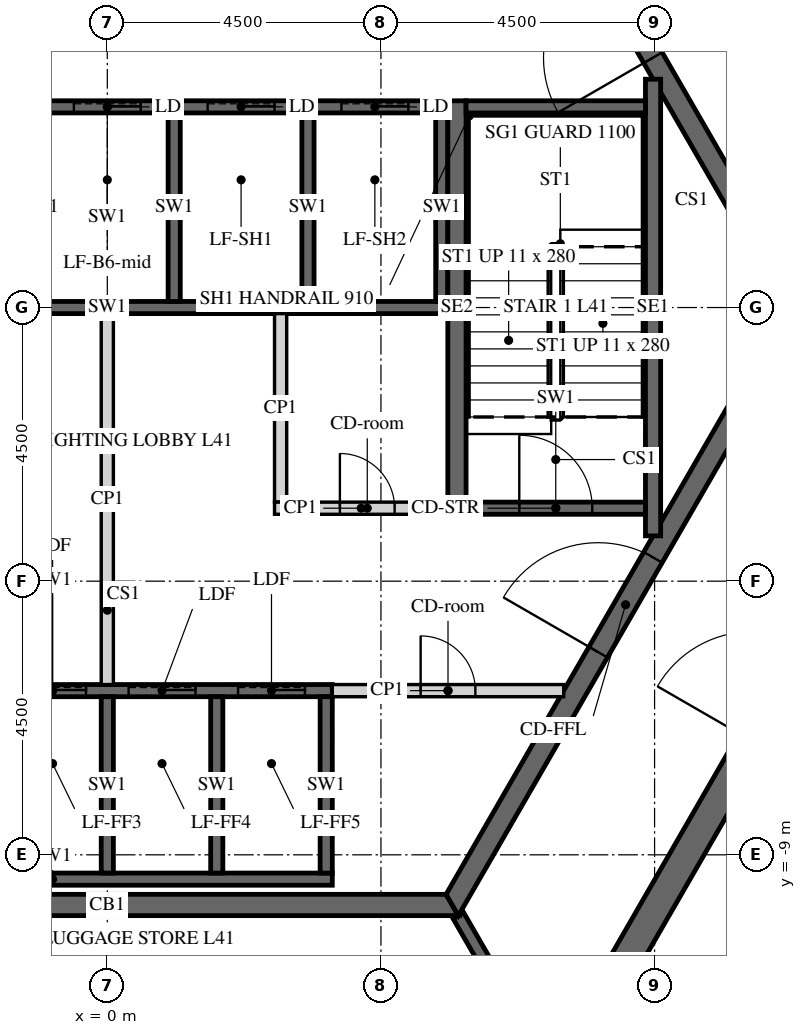
"""IFC4 building model, lengths in metres.
Left out: names, types, materials, properties, quantities, classifications, styles, units other than length and angle.
Written with IfcOpenShell. Run it as: python <this file> out.ifc"""

import sys

from ifc_helpers import new_model, si_unit, direction, frame, frame_2d, origin, place, context, subcontext, project, spatial, polyline, rectangle, outline, extrude, element, fill, save


model = new_model("IFC4")
c1 = context("Model", 3, precision=1e-05, world=origin(), true_north=direction((0.0, 1.0)))
c2 = subcontext(c1, "Body", "Model", "MODEL_VIEW")
j1 = project(units=[si_unit("LENGTHUNIT", "METRE"), si_unit("PLANEANGLEUNIT", "RADIAN")], contexts=[c1])
p1 = place(None, origin())
s1 = spatial("IfcSite", under=j1, at=p1, CompositionType="ELEMENT")
p2 = place(p1, origin())
s2 = spatial("IfcBuilding", under=s1, at=p2, CompositionType="ELEMENT")
p3 = place(p2, frame((0.0, 0.0, 176.1)))
s3 = spatial("IfcBuildingStorey", under=s2, at=p3, CompositionType="ELEMENT", Elevation=176.1)
p4 = place(p3, frame((7.361, -12.75, -0.15), z_axis=(0.0, 0.0, 1.0), x_axis=(0.50000571537, 0.866022103989, 0.0)))
e1 = element("IfcWall", 1, at=p4, inside=s3, PredefinedType="SHEAR", context=c2, shape_type="SweptSolid", body=[
    extrude(outline(polyline([(-0.144, -0.25), (14.867, -0.25), (14.578, 0.25), (0.144, 0.25), (-0.144, -0.25)])), origin(), (0.0, 0.0, 1.0), 3.9),
])
p5 = place(p4, frame((6.49, 0.0, 0.15)))
e2 = element("IfcOpeningElement", 2, at=p5, cuts=e1, PredefinedType="OPENING", context=c2, shape_type="SweptSolid", body=[
    extrude(rectangle(XDim=1.8, YDim=2.4, at=frame_2d((0.9, 1.2))), frame((0.0, 0.26, 0.0), z_axis=(0.0, -1.0, 0.0), x_axis=(1.0, 0.0, 0.0)), (0.0, 0.0, 1.0), 0.52),
])
p6 = place(p3, frame((14.722, 0.0, -0.15), z_axis=(0.0, 0.0, 1.0), x_axis=(-0.50000571537, 0.866022103989, 0.0)))
e3 = element("IfcWall", 3, at=p6, inside=s3, PredefinedType="SHEAR", context=c2, shape_type="SweptSolid", body=[
    extrude(outline(polyline([(-0.144, -0.25), (14.867, -0.25), (14.578, 0.25), (0.144, 0.25), (-0.144, -0.25)])), origin(), (0.0, 0.0, 1.0), 3.9),
])
p7 = place(p6, frame((6.432, 0.0, 0.15)))
e4 = element("IfcOpeningElement", 4, at=p7, cuts=e3, PredefinedType="OPENING", context=c2, shape_type="SweptSolid", body=[
    extrude(rectangle(XDim=1.8, YDim=2.4, at=frame_2d((0.9, 1.2))), frame((0.0, 0.26, 0.0), z_axis=(0.0, -1.0, 0.0), x_axis=(1.0, 0.0, 0.0)), (0.0, 0.0, 1.0), 0.52),
])
p8 = place(p3, frame((-5.673, -9.825, -0.15), z_axis=(0.0, 0.0, 1.0), x_axis=(1.0, 0.0, 0.0)))
e5 = element("IfcWall", 5, at=p8, inside=s3, PredefinedType="SHEAR", context=c2, shape_type="SweptSolid", body=[
    extrude(outline(polyline([(-0.101, -0.175), (11.446, -0.175), (11.244, 0.175), (0.101, 0.175), (-0.101, -0.175)])), origin(), (0.0, 0.0, 1.0), 3.9),
])
p9 = place(p3, frame((5.673, -9.825, -0.15), z_axis=(0.0, 0.0, 1.0), x_axis=(0.499995046907, 0.866028263435, 0.0)))
e6 = element("IfcWall", 6, at=p9, inside=s3, PredefinedType="SHEAR", context=c2, shape_type="SweptSolid", body=[
    extrude(outline(polyline([(-0.101, -0.175), (11.446, -0.175), (11.244, 0.175), (0.101, 0.175), (-0.101, -0.175)])), origin(), (0.0, 0.0, 1.0), 3.9),
])
p10 = place(p9, frame((4.801, 0.0, 0.15)))
e7 = element("IfcOpeningElement", 7, at=p10, cuts=e6, PredefinedType="OPENING", context=c2, shape_type="SweptSolid", body=[
    extrude(rectangle(XDim=1.8, YDim=2.4, at=frame_2d((0.9, 1.2))), frame((0.0, 0.185, 0.0), z_axis=(0.0, -1.0, 0.0), x_axis=(1.0, 0.0, 0.0)), (0.0, 0.0, 1.0), 0.37),
])
p11 = place(p3, frame((11.345, 0.0, -0.15), z_axis=(0.0, 0.0, 1.0), x_axis=(-0.499995046907, 0.866028263435, 0.0)))
e8 = element("IfcWall", 8, at=p11, inside=s3, PredefinedType="SHEAR", context=c2, shape_type="SweptSolid", body=[
    extrude(outline(polyline([(-0.101, -0.175), (11.446, -0.175), (11.244, 0.175), (0.101, 0.175), (-0.101, -0.175)])), origin(), (0.0, 0.0, 1.0), 3.9),
])
p12 = place(p11, frame((4.744, 0.0, 0.15)))
e9 = element("IfcOpeningElement", 9, at=p12, cuts=e8, PredefinedType="OPENING", context=c2, shape_type="SweptSolid", body=[
    extrude(rectangle(XDim=1.8, YDim=2.4, at=frame_2d((0.9, 1.2))), frame((0.0, 0.185, 0.0), z_axis=(0.0, -1.0, 0.0), x_axis=(1.0, 0.0, 0.0)), (0.0, 0.0, 1.0), 0.37),
])
p13 = place(p3, frame((-5.6, 3.3, -0.25), z_axis=(0.0, 0.0, 1.0), x_axis=(1.0, 0.0, 0.0)))
e10 = element("IfcWall", 10, at=p13, inside=s3, PredefinedType="SHEAR", context=c2, shape_type="SweptSolid", body=[
    extrude(rectangle(XDim=11.2, YDim=0.2, at=frame_2d((5.6, 0.0))), origin(), (0.0, 0.0, 1.0), 3.9),
])
p14 = place(p13, frame((0.65, 0.0, 0.25)))
e11 = element("IfcOpeningElement", 11, at=p14, cuts=e10, PredefinedType="OPENING", context=c2, shape_type="SweptSolid", body=[
    extrude(rectangle(XDim=1.1, YDim=2.1, at=frame_2d((0.55, 1.05))), frame((0.0, 0.11, 0.0), z_axis=(0.0, -1.0, 0.0), x_axis=(1.0, 0.0, 0.0)), (0.0, 0.0, 1.0), 0.22),
])
p15 = place(p13, frame((2.85, 0.0, 0.25)))
e12 = element("IfcOpeningElement", 12, at=p15, cuts=e10, PredefinedType="OPENING", context=c2, shape_type="SweptSolid", body=[
    extrude(rectangle(XDim=1.1, YDim=2.1, at=frame_2d((0.55, 1.05))), frame((0.0, 0.11, 0.0), z_axis=(0.0, -1.0, 0.0), x_axis=(1.0, 0.0, 0.0)), (0.0, 0.0, 1.0), 0.22),
])
p16 = place(p13, frame((5.05, 0.0, 0.25)))
e13 = element("IfcOpeningElement", 13, at=p16, cuts=e10, PredefinedType="OPENING", context=c2, shape_type="SweptSolid", body=[
    extrude(rectangle(XDim=1.1, YDim=2.1, at=frame_2d((0.55, 1.05))), frame((0.0, 0.11, 0.0), z_axis=(0.0, -1.0, 0.0), x_axis=(1.0, 0.0, 0.0)), (0.0, 0.0, 1.0), 0.22),
])
p17 = place(p13, frame((7.25, 0.0, 0.25)))
e14 = element("IfcOpeningElement", 14, at=p17, cuts=e10, PredefinedType="OPENING", context=c2, shape_type="SweptSolid", body=[
    extrude(rectangle(XDim=1.1, YDim=2.1, at=frame_2d((0.55, 1.05))), frame((0.0, 0.11, 0.0), z_axis=(0.0, -1.0, 0.0), x_axis=(1.0, 0.0, 0.0)), (0.0, 0.0, 1.0), 0.22),
])
p18 = place(p13, frame((9.45, 0.0, 0.25)))
e15 = element("IfcOpeningElement", 15, at=p18, cuts=e10, PredefinedType="OPENING", context=c2, shape_type="SweptSolid", body=[
    extrude(rectangle(XDim=1.1, YDim=2.1, at=frame_2d((0.55, 1.05))), frame((0.0, 0.11, 0.0), z_axis=(0.0, -1.0, 0.0), x_axis=(1.0, 0.0, 0.0)), (0.0, 0.0, 1.0), 0.22),
])
p19 = place(p3, frame((-5.6, 0.0, -0.25), z_axis=(0.0, 0.0, 1.0), x_axis=(1.0, 0.0, 0.0)))
e16 = element("IfcWall", 16, at=p19, inside=s3, PredefinedType="SHEAR", context=c2, shape_type="SweptSolid", body=[
    extrude(rectangle(XDim=11.2, YDim=0.2, at=frame_2d((5.6, 0.0))), origin(), (0.0, 0.0, 1.0), 3.9),
])
for number, where, z_axis, x_axis in (
    (17, (1.1, 0.1, -0.25), (0.0, 0.0, 1.0), (0.0, 1.0, 0.0)),
    (18, (3.3, 0.1, -0.25), (0.0, 0.0, 1.0), (0.0, 1.0, 0.0)),
    (19, (5.5, 0.1, -0.25), (0.0, 0.0, 1.0), (0.0, 1.0, 0.0)),
):
    element("IfcWall", number, at=place(p3, frame(where, z_axis=z_axis, x_axis=x_axis)), inside=s3, PredefinedType="SHEAR", context=c2, shape_type="SweptSolid", body=[
        extrude(rectangle(XDim=3.1, YDim=0.2, at=frame_2d((1.55, 0.0))), origin(), (0.0, 0.0, 1.0), 3.9),
    ])
p20 = place(p3, frame((-5.5, -6.3, -0.25), z_axis=(0.0, 0.0, 1.0), x_axis=(1.0, 0.0, 0.0)))
e20 = element("IfcWall", 20, at=p20, inside=s3, PredefinedType="SHEAR", context=c2, shape_type="SweptSolid", body=[
    extrude(rectangle(XDim=9.2, YDim=0.2, at=frame_2d((4.6, 0.0))), origin(), (0.0, 0.0, 1.0), 3.9),
])
p21 = place(p20, frame((0.45, 0.0, 0.25)))
e21 = element("IfcOpeningElement", 21, at=p21, cuts=e20, PredefinedType="OPENING", context=c2, shape_type="SweptSolid", body=[
    extrude(rectangle(XDim=1.1, YDim=2.1, at=frame_2d((0.55, 1.05))), frame((0.0, 0.11, 0.0), z_axis=(0.0, -1.0, 0.0), x_axis=(1.0, 0.0, 0.0)), (0.0, 0.0, 1.0), 0.22),
])
p22 = place(p20, frame((2.25, 0.0, 0.25)))
e22 = element("IfcOpeningElement", 22, at=p22, cuts=e20, PredefinedType="OPENING", context=c2, shape_type="SweptSolid", body=[
    extrude(rectangle(XDim=1.1, YDim=2.1, at=frame_2d((0.55, 1.05))), frame((0.0, 0.11, 0.0), z_axis=(0.0, -1.0, 0.0), x_axis=(1.0, 0.0, 0.0)), (0.0, 0.0, 1.0), 0.22),
])
p23 = place(p20, frame((4.05, 0.0, 0.25)))
e23 = element("IfcOpeningElement", 23, at=p23, cuts=e20, PredefinedType="OPENING", context=c2, shape_type="SweptSolid", body=[
    extrude(rectangle(XDim=1.1, YDim=2.1, at=frame_2d((0.55, 1.05))), frame((0.0, 0.11, 0.0), z_axis=(0.0, -1.0, 0.0), x_axis=(1.0, 0.0, 0.0)), (0.0, 0.0, 1.0), 0.22),
])
p24 = place(p20, frame((5.85, 0.0, 0.25)))
e24 = element("IfcOpeningElement", 24, at=p24, cuts=e20, PredefinedType="OPENING", context=c2, shape_type="SweptSolid", body=[
    extrude(rectangle(XDim=1.1, YDim=2.1, at=frame_2d((0.55, 1.05))), frame((0.0, 0.11, 0.0), z_axis=(0.0, -1.0, 0.0), x_axis=(1.0, 0.0, 0.0)), (0.0, 0.0, 1.0), 0.22),
])
p25 = place(p20, frame((7.65, 0.0, 0.25)))
e25 = element("IfcOpeningElement", 25, at=p25, cuts=e20, PredefinedType="OPENING", context=c2, shape_type="SweptSolid", body=[
    extrude(rectangle(XDim=1.1, YDim=2.1, at=frame_2d((0.55, 1.05))), frame((0.0, 0.11, 0.0), z_axis=(0.0, -1.0, 0.0), x_axis=(1.0, 0.0, 0.0)), (0.0, 0.0, 1.0), 0.22),
])
p26 = place(p3, frame((-5.5, -9.4, -0.25), z_axis=(0.0, 0.0, 1.0), x_axis=(1.0, 0.0, 0.0)))
e26 = element("IfcWall", 26, at=p26, inside=s3, PredefinedType="SHEAR", context=c2, shape_type="SweptSolid", body=[
    extrude(rectangle(XDim=9.2, YDim=0.2, at=frame_2d((4.6, 0.0))), origin(), (0.0, 0.0, 1.0), 3.9),
])
for number, where, z_axis, x_axis in (
    (27, (0.0, -9.3, -0.25), (0.0, 0.0, 1.0), (0.0, 1.0, 0.0)),
    (28, (1.8, -9.3, -0.25), (0.0, 0.0, 1.0), (0.0, 1.0, 0.0)),
    (29, (3.6, -9.3, -0.25), (0.0, 0.0, 1.0), (0.0, 1.0, 0.0)),
):
    element("IfcWall", number, at=place(p3, frame(where, z_axis=z_axis, x_axis=x_axis)), inside=s3, PredefinedType="SHEAR", context=c2, shape_type="SweptSolid", body=[
        extrude(rectangle(XDim=2.9, YDim=0.2, at=frame_2d((1.45, 0.0))), origin(), (0.0, 0.0, 1.0), 3.9),
    ])
p27 = place(p3, frame((2.75, -3.3, 0.0), z_axis=(0.0, 0.0, 1.0), x_axis=(1.0, 0.0, 0.0)))
e30 = element("IfcWall", 30, at=p27, inside=s3, PredefinedType="PARTITIONING", context=c2, shape_type="SweptSolid", body=[
    extrude(rectangle(XDim=2.85, YDim=0.2, at=frame_2d((1.425, 0.0))), origin(), (0.0, 0.0, 1.0), 3.65),
])
p28 = place(p27, frame((1.075, 0.0, 0.0)))
e31 = element("IfcOpeningElement", 31, at=p28, cuts=e30, PredefinedType="OPENING", context=c2, shape_type="SweptSolid", body=[
    extrude(rectangle(XDim=0.9, YDim=2.1, at=frame_2d((0.45, 1.05))), frame((0.0, 0.11, 0.0), z_axis=(0.0, -1.0, 0.0), x_axis=(1.0, 0.0, 0.0)), (0.0, 0.0, 1.0), 0.22),
])
p29 = place(p3, frame((2.85, -3.2, 0.0), z_axis=(0.0, 0.0, 1.0), x_axis=(0.0, 1.0, 0.0)))
e32 = element("IfcWall", 32, at=p29, inside=s3, PredefinedType="PARTITIONING", context=c2, shape_type="SweptSolid", body=[
    extrude(rectangle(XDim=3.1, YDim=0.2, at=frame_2d((1.55, 0.0))), origin(), (0.0, 0.0, 1.0), 3.65),
])
p30 = place(p3, frame((0.0, -6.2, 0.0), z_axis=(0.0, 0.0, 1.0), x_axis=(0.0, 1.0, 0.0)))
e33 = element("IfcWall", 33, at=p30, inside=s3, PredefinedType="PARTITIONING", context=c2, shape_type="SweptSolid", body=[
    extrude(rectangle(XDim=6.1, YDim=0.2, at=frame_2d((3.05, 0.0))), origin(), (0.0, 0.0, 1.0), 3.65),
])
p31 = place(p3, frame((3.7, -6.3, 0.0), z_axis=(0.0, 0.0, 1.0), x_axis=(1.0, 0.0, 0.0)))
e34 = element("IfcWall", 34, at=p31, inside=s3, PredefinedType="PARTITIONING", context=c2, shape_type="SweptSolid", body=[
    extrude(rectangle(XDim=3.806, YDim=0.2, at=frame_2d((1.903, 0.0))), origin(), (0.0, 0.0, 1.0), 3.65),
])
p32 = place(p31, frame((1.453, 0.0, 0.0)))
e35 = element("IfcOpeningElement", 35, at=p32, cuts=e34, PredefinedType="OPENING", context=c2, shape_type="SweptSolid", body=[
    extrude(rectangle(XDim=0.9, YDim=2.1, at=frame_2d((0.45, 1.05))), frame((0.0, 0.11, 0.0), z_axis=(0.0, -1.0, 0.0), x_axis=(1.0, 0.0, 0.0)), (0.0, 0.0, 1.0), 0.22),
])
p33 = place(p3, frame((5.773, -10.0, -0.15), z_axis=(0.0, 0.0, 1.0), x_axis=(0.499995765644, -0.866027848477, 0.0)))
e36 = element("IfcWall", 36, at=p33, inside=s3, PredefinedType="SHEAR", context=c2, shape_type="SweptSolid", body=[
    extrude(rectangle(XDim=2.887, YDim=0.2, at=frame_2d((1.443, 0.0))), origin(), (0.0, 0.0, 1.0), 3.9),
])
p34 = place(p3, frame((5.75, -3.4, -0.25), z_axis=(0.0, 0.0, 1.0), x_axis=(0.0, 1.0, 0.0)))
e37 = element("IfcWall", 37, at=p34, inside=s3, PredefinedType="SHEAR", context=c2, shape_type="SweptSolid", body=[
    extrude(rectangle(XDim=6.8, YDim=0.3, at=frame_2d((3.4, 0.0))), origin(), (0.0, 0.0, 1.0), 3.9),
])
p35 = place(p3, frame((8.975, -3.755, -0.25), z_axis=(0.0, 0.0, 1.0), x_axis=(0.0, 1.0, 0.0)))
e38 = element("IfcWall", 38, at=p35, inside=s3, PredefinedType="SHEAR", context=c2, shape_type="SweptSolid", body=[
    extrude(rectangle(XDim=7.51, YDim=0.25, at=frame_2d((3.755, 0.0))), origin(), (0.0, 0.0, 1.0), 3.9),
])
p36 = place(p3, frame((5.9, 3.3, -0.25), z_axis=(0.0, 0.0, 1.0), x_axis=(1.0, 0.0, 0.0)))
e39 = element("IfcWall", 39, at=p36, inside=s3, PredefinedType="SHEAR", context=c2, shape_type="SweptSolid", body=[
    extrude(rectangle(XDim=2.95, YDim=0.2, at=frame_2d((1.475, 0.0))), origin(), (0.0, 0.0, 1.0), 3.9),
])
p37 = place(p3, frame((5.9, -3.3, -0.25), z_axis=(0.0, 0.0, 1.0), x_axis=(1.0, 0.0, 0.0)))
e40 = element("IfcWall", 40, at=p37, inside=s3, PredefinedType="SHEAR", context=c2, shape_type="SweptSolid", body=[
    extrude(rectangle(XDim=2.95, YDim=0.2, at=frame_2d((1.475, 0.0))), origin(), (0.0, 0.0, 1.0), 3.9),
])
p38 = place(p37, frame((0.875, 0.0, 0.25)))
e41 = element("IfcOpeningElement", 41, at=p38, cuts=e40, PredefinedType="OPENING", context=c2, shape_type="SweptSolid", body=[
    extrude(rectangle(XDim=1.2, YDim=2.4, at=frame_2d((0.6, 1.2))), frame((0.0, 0.11, 0.0), z_axis=(0.0, -1.0, 0.0), x_axis=(1.0, 0.0, 0.0)), (0.0, 0.0, 1.0), 0.22),
])
p39 = place(p3, frame((17.046, 0.075, 0.0), z_axis=(0.0, 0.0, 1.0), x_axis=(-0.499999403554, 0.866025748143, 0.0)))
e42 = element("IfcWall", 42, at=p39, inside=s3, PredefinedType="PARTITIONING", context=c2, shape_type="SweptSolid", body=[
    extrude(rectangle(XDim=14.549, YDim=0.15, at=frame_2d((7.275, 0.0))), origin(), (0.0, 0.0, 1.0), 2.988),
])
p40 = place(p39, frame((6.901, 0.0, 0.0)))
e43 = element("IfcOpeningElement", 43, at=p40, cuts=e42, PredefinedType="OPENING", context=c2, shape_type="SweptSolid", body=[
    extrude(rectangle(XDim=1.0, YDim=2.1, at=frame_2d((0.5, 1.05))), frame((0.0, 0.085, 0.0), z_axis=(0.0, -1.0, 0.0), x_axis=(1.0, 0.0, 0.0)), (0.0, 0.0, 1.0), 0.17),
])
p41 = place(p12, origin())
e44 = element("IfcDoor", 44, at=p41, inside=s3, OperationType="DOUBLE_DOOR_SINGLE_SWING", PredefinedType="DOOR", context=c2, shape_type="SweptSolid", body=[
    extrude(rectangle(XDim=1.8, YDim=2.4, at=frame_2d((0.9, 1.2))), frame((0.0, 0.025, 0.0), z_axis=(0.0, -1.0, 0.0), x_axis=(1.0, 0.0, 0.0)), (0.0, 0.0, 1.0), 0.05),
])
fill(e9, e44)
p42 = place(p10, origin())
e45 = element("IfcDoor", 45, at=p42, inside=s3, OperationType="DOUBLE_DOOR_SINGLE_SWING", PredefinedType="DOOR", context=c2, shape_type="SweptSolid", body=[
    extrude(rectangle(XDim=1.8, YDim=2.4, at=frame_2d((0.9, 1.2))), frame((0.0, 0.025, 0.0), z_axis=(0.0, -1.0, 0.0), x_axis=(1.0, 0.0, 0.0)), (0.0, 0.0, 1.0), 0.05),
])
fill(e7, e45)
p43 = place(p28, origin())
e46 = element("IfcDoor", 46, at=p43, inside=s3, OperationType="SINGLE_SWING_LEFT", PredefinedType="DOOR", context=c2, shape_type="SweptSolid", body=[
    extrude(rectangle(XDim=0.9, YDim=2.1, at=frame_2d((0.45, 1.05))), frame((0.0, 0.025, 0.0), z_axis=(0.0, -1.0, 0.0), x_axis=(1.0, 0.0, 0.0)), (0.0, 0.0, 1.0), 0.05),
])
fill(e31, e46)
p44 = place(p32, origin())
e47 = element("IfcDoor", 47, at=p44, inside=s3, OperationType="SINGLE_SWING_LEFT", PredefinedType="DOOR", context=c2, shape_type="SweptSolid", body=[
    extrude(rectangle(XDim=0.9, YDim=2.1, at=frame_2d((0.45, 1.05))), frame((0.0, 0.025, 0.0), z_axis=(0.0, -1.0, 0.0), x_axis=(1.0, 0.0, 0.0)), (0.0, 0.0, 1.0), 0.05),
])
fill(e35, e47)
p45 = place(p38, origin())
e48 = element("IfcDoor", 48, at=p45, inside=s3, OperationType="SINGLE_SWING_LEFT", PredefinedType="DOOR", context=c2, shape_type="SweptSolid", body=[
    extrude(rectangle(XDim=1.2, YDim=2.4, at=frame_2d((0.6, 1.2))), frame((0.0, 0.025, 0.0), z_axis=(0.0, -1.0, 0.0), x_axis=(1.0, 0.0, 0.0)), (0.0, 0.0, 1.0), 0.05),
])
fill(e41, e48)
p46 = place(p16, origin())
e49 = element("IfcDoor", 49, at=p46, inside=s3, OperationType="SLIDING_TO_LEFT", PredefinedType="DOOR", context=c2, shape_type="SweptSolid", body=[
    extrude(rectangle(XDim=1.1, YDim=2.1, at=frame_2d((0.55, 1.05))), frame((0.0, 0.025, 0.0), z_axis=(0.0, -1.0, 0.0), x_axis=(1.0, 0.0, 0.0)), (0.0, 0.0, 1.0), 0.05),
])
fill(e13, e49)
p47 = place(p17, origin())
e50 = element("IfcDoor", 50, at=p47, inside=s3, OperationType="SLIDING_TO_LEFT", PredefinedType="DOOR", context=c2, shape_type="SweptSolid", body=[
    extrude(rectangle(XDim=1.1, YDim=2.1, at=frame_2d((0.55, 1.05))), frame((0.0, 0.025, 0.0), z_axis=(0.0, -1.0, 0.0), x_axis=(1.0, 0.0, 0.0)), (0.0, 0.0, 1.0), 0.05),
])
fill(e14, e50)
p48 = place(p18, origin())
e51 = element("IfcDoor", 51, at=p48, inside=s3, OperationType="SLIDING_TO_LEFT", PredefinedType="DOOR", context=c2, shape_type="SweptSolid", body=[
    extrude(rectangle(XDim=1.1, YDim=2.1, at=frame_2d((0.55, 1.05))), frame((0.0, 0.025, 0.0), z_axis=(0.0, -1.0, 0.0), x_axis=(1.0, 0.0, 0.0)), (0.0, 0.0, 1.0), 0.05),
])
fill(e15, e51)
p49 = place(p23, origin())
e52 = element("IfcDoor", 52, at=p49, inside=s3, OperationType="SLIDING_TO_LEFT", PredefinedType="DOOR", context=c2, shape_type="SweptSolid", body=[
    extrude(rectangle(XDim=1.1, YDim=2.1, at=frame_2d((0.55, 1.05))), frame((0.0, 0.025, 0.0), z_axis=(0.0, -1.0, 0.0), x_axis=(1.0, 0.0, 0.0)), (0.0, 0.0, 1.0), 0.05),
])
fill(e23, e52)
p50 = place(p24, origin())
e53 = element("IfcDoor", 53, at=p50, inside=s3, OperationType="SLIDING_TO_LEFT", PredefinedType="DOOR", context=c2, shape_type="SweptSolid", body=[
    extrude(rectangle(XDim=1.1, YDim=2.1, at=frame_2d((0.55, 1.05))), frame((0.0, 0.025, 0.0), z_axis=(0.0, -1.0, 0.0), x_axis=(1.0, 0.0, 0.0)), (0.0, 0.0, 1.0), 0.05),
])
fill(e24, e53)
p51 = place(p25, origin())
e54 = element("IfcDoor", 54, at=p51, inside=s3, OperationType="SLIDING_TO_LEFT", PredefinedType="DOOR", context=c2, shape_type="SweptSolid", body=[
    extrude(rectangle(XDim=1.1, YDim=2.1, at=frame_2d((0.55, 1.05))), frame((0.0, 0.025, 0.0), z_axis=(0.0, -1.0, 0.0), x_axis=(1.0, 0.0, 0.0)), (0.0, 0.0, 1.0), 0.05),
])
fill(e25, e54)
save(model, sys.argv[1])
